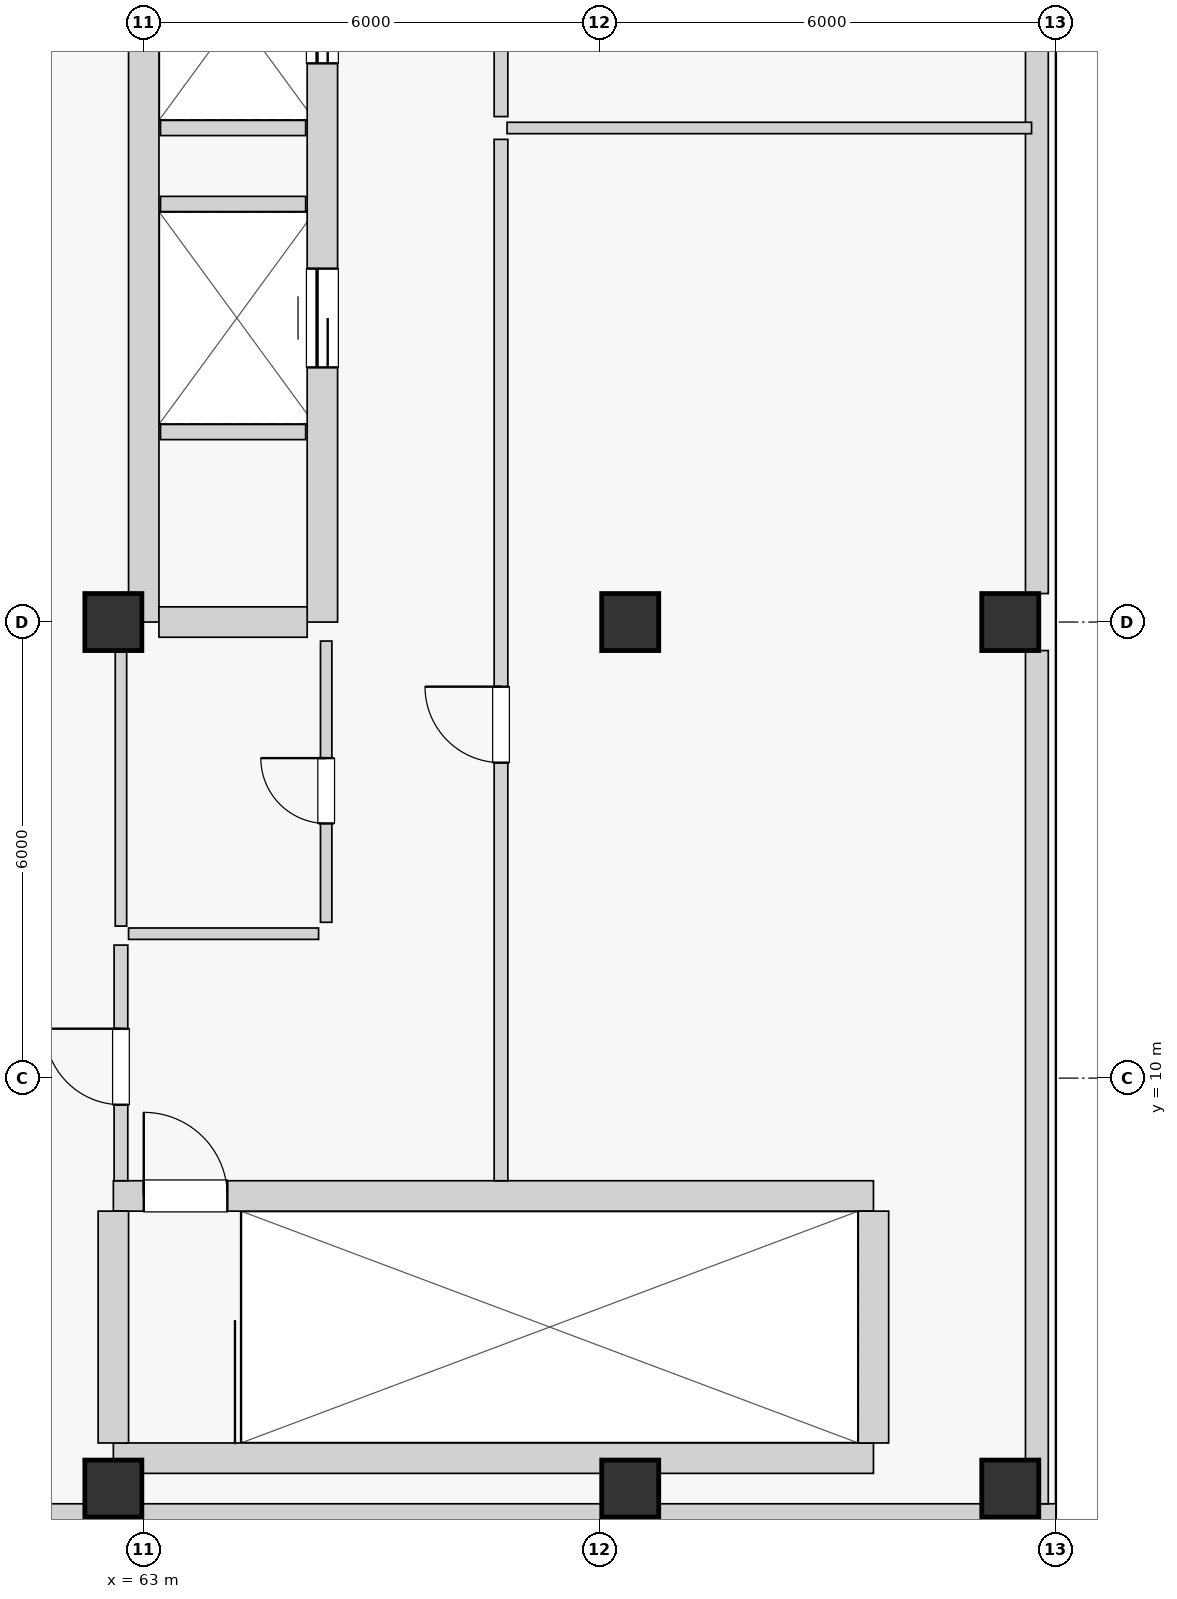
"""IFC4 building model, lengths in metres.
Left out: names, types, materials, properties, quantities, classifications, styles, units other than length and angle.
Written with IfcOpenShell. Run it as: python <this file> out.ifc"""

import sys

from ifc_helpers import new_model, si_unit, direction, frame, frame_2d, origin, origin_2d, place, context, subcontext, project, spatial, rectangle, extrude, source, transform, mapped, element, fill, save


model = new_model("IFC4")
c1 = context("Model", 3, precision=1e-05, world=origin(), true_north=direction((0.0, 1.0)))
c2 = subcontext(c1, "Body", "Model", "MODEL_VIEW")
j1 = project(units=[si_unit("LENGTHUNIT", "METRE"), si_unit("PLANEANGLEUNIT", "RADIAN")], contexts=[c1])
p1 = place(None, origin())
s1 = spatial("IfcSite", under=j1, at=p1, CompositionType="ELEMENT")
p2 = place(p1, origin())
s2 = spatial("IfcBuilding", under=s1, at=p2, CompositionType="ELEMENT")
p3 = place(p2, frame((0.0, 0.0, 18.4)))
s3 = spatial("IfcBuildingStorey", under=s2, at=p3, CompositionType="ELEMENT", Elevation=18.4)
for number, where, z_axis, x_axis in (
    (1, (62.6, 4.6, 0.0), (0.0, 0.0, 1.0), (1.0, 0.0, 0.0)),
    (2, (62.6, 16.0, 0.0), (0.0, 0.0, 1.0), (1.0, 0.0, 0.0)),
    (3, (69.4, 4.6, 0.0), (0.0, 0.0, 1.0), (1.0, 0.0, 0.0)),
    (4, (69.4, 16.0, 0.0), (0.0, 0.0, 1.0), (1.0, 0.0, 0.0)),
    (5, (74.4, 4.6, 0.0), (0.0, 0.0, 1.0), (1.0, 0.0, 0.0)),
    (6, (74.4, 16.0, 0.0), (0.0, 0.0, 1.0), (1.0, 0.0, 0.0)),
):
    element("IfcColumn", number, at=place(p3, frame(where, z_axis=z_axis, x_axis=x_axis)), inside=s3, PredefinedType="COLUMN", context=c2, shape_type="SweptSolid", body=[
        extrude(rectangle(XDim=0.75, YDim=0.75, at=origin_2d()), origin(), (0.0, 0.0, 1.0), 4.4),
    ])
p4 = place(p3, frame((57.0, 4.25, 0.0), z_axis=(0.0, 0.0, 1.0), x_axis=(1.0, 0.0, 0.0)))
e7 = element("IfcWall", 7, at=p4, inside=s3, PredefinedType="SOLIDWALL", context=c2, shape_type="SweptSolid", body=[
    extrude(rectangle(XDim=5.225, YDim=0.3, at=frame_2d((2.613, 0.0))), origin(), (0.0, 0.0, 1.0), 3.39),
])
p5 = place(p4, frame((2.2, 0.0, 0.85)))
e8 = element("IfcOpeningElement", 8, at=p5, cuts=e7, PredefinedType="OPENING", context=c2, shape_type="SweptSolid", body=[
    extrude(rectangle(XDim=1.8, YDim=1.65, at=frame_2d((0.9, 0.825))), frame((0.0, 0.16, 0.0), z_axis=(0.0, -1.0, 0.0), x_axis=(1.0, 0.0, 0.0)), (0.0, 0.0, 1.0), 0.32),
])
p6 = place(p3, frame((62.975, 4.25, 0.0), z_axis=(0.0, 0.0, 1.0), x_axis=(1.0, 0.0, 0.0)))
e9 = element("IfcWall", 9, at=p6, inside=s3, PredefinedType="SOLIDWALL", context=c2, shape_type="SweptSolid", body=[
    extrude(rectangle(XDim=6.05, YDim=0.3, at=frame_2d((3.025, 0.0))), origin(), (0.0, 0.0, 1.0), 3.39),
])
p7 = place(p6, frame((2.125, 0.0, 0.85)))
e10 = element("IfcOpeningElement", 10, at=p7, cuts=e9, PredefinedType="OPENING", context=c2, shape_type="SweptSolid", body=[
    extrude(rectangle(XDim=1.8, YDim=1.65, at=frame_2d((0.9, 0.825))), frame((0.0, 0.16, 0.0), z_axis=(0.0, -1.0, 0.0), x_axis=(1.0, 0.0, 0.0)), (0.0, 0.0, 1.0), 0.32),
])
p8 = place(p3, frame((69.775, 4.25, 0.0), z_axis=(0.0, 0.0, 1.0), x_axis=(1.0, 0.0, 0.0)))
e11 = element("IfcWall", 11, at=p8, inside=s3, PredefinedType="SOLIDWALL", context=c2, shape_type="SweptSolid", body=[
    extrude(rectangle(XDim=5.225, YDim=0.3, at=frame_2d((2.613, 0.0))), origin(), (0.0, 0.0, 1.0), 3.39),
])
p9 = place(p8, frame((1.225, 0.0, 0.85)))
e12 = element("IfcOpeningElement", 12, at=p9, cuts=e11, PredefinedType="OPENING", context=c2, shape_type="SweptSolid", body=[
    extrude(rectangle(XDim=1.8, YDim=1.65, at=frame_2d((0.9, 0.825))), frame((0.0, 0.16, 0.0), z_axis=(0.0, -1.0, 0.0), x_axis=(1.0, 0.0, 0.0)), (0.0, 0.0, 1.0), 0.32),
])
p10 = place(p3, frame((74.75, 4.4, 0.0), z_axis=(0.0, 0.0, 1.0), x_axis=(0.0, 1.0, 0.0)))
e13 = element("IfcWall", 13, at=p10, inside=s3, PredefinedType="SOLIDWALL", context=c2, shape_type="SweptSolid", body=[
    extrude(rectangle(XDim=11.225, YDim=0.3, at=frame_2d((5.613, 0.0))), origin(), (0.0, 0.0, 1.0), 3.39),
])
p11 = place(p10, frame((5.3, 0.0, 0.95)))
e14 = element("IfcOpeningElement", 14, at=p11, cuts=e13, PredefinedType="OPENING", context=c2, shape_type="SweptSolid", body=[
    extrude(rectangle(XDim=1.2, YDim=1.5, at=frame_2d((0.6, 0.75))), frame((0.0, 0.16, 0.0), z_axis=(0.0, -1.0, 0.0), x_axis=(1.0, 0.0, 0.0)), (0.0, 0.0, 1.0), 0.32),
])
p12 = place(p3, frame((74.75, 16.375, 0.0), z_axis=(0.0, 0.0, 1.0), x_axis=(0.0, 1.0, 0.0)))
e15 = element("IfcWall", 15, at=p12, inside=s3, PredefinedType="SOLIDWALL", context=c2, shape_type="SweptSolid", body=[
    extrude(rectangle(XDim=11.25, YDim=0.3, at=frame_2d((5.625, 0.0))), origin(), (0.0, 0.0, 1.0), 3.39),
])
p13 = place(p12, frame((5.025, 0.0, 0.95)))
e16 = element("IfcOpeningElement", 16, at=p13, cuts=e15, PredefinedType="OPENING", context=c2, shape_type="SweptSolid", body=[
    extrude(rectangle(XDim=1.2, YDim=1.5, at=frame_2d((0.6, 0.75))), frame((0.0, 0.16, 0.0), z_axis=(0.0, -1.0, 0.0), x_axis=(1.0, 0.0, 0.0)), (0.0, 0.0, 1.0), 0.32),
])
p14 = place(p3, frame((63.0, 16.0, 0.0), z_axis=(0.0, 0.0, 1.0), x_axis=(0.0, 1.0, 0.0)))
e17 = element("IfcWall", 17, at=p14, inside=s3, PredefinedType="SHEAR", context=c2, shape_type="SweptSolid", body=[
    extrude(rectangle(XDim=12.0, YDim=0.4, at=frame_2d((6.0, 0.0))), origin(), (0.0, 0.0, 1.0), 4.14),
])
p15 = place(p3, frame((65.35, 16.0, 0.0), z_axis=(0.0, 0.0, 1.0), x_axis=(0.0, 1.0, 0.0)))
e18 = element("IfcWall", 18, at=p15, inside=s3, PredefinedType="SHEAR", context=c2, shape_type="SweptSolid", body=[
    extrude(rectangle(XDim=12.0, YDim=0.4, at=frame_2d((6.0, 0.0))), origin(), (0.0, 0.0, 1.0), 4.14),
])
p16 = place(p15, frame((3.35, 0.0, 0.0)))
e19 = element("IfcOpeningElement", 19, at=p16, cuts=e18, PredefinedType="OPENING", context=c2, shape_type="SweptSolid", body=[
    extrude(rectangle(XDim=1.3, YDim=2.25, at=frame_2d((0.65, 1.125))), frame((0.0, 0.21, 0.0), z_axis=(0.0, -1.0, 0.0), x_axis=(1.0, 0.0, 0.0)), (0.0, 0.0, 1.0), 0.42),
])
p17 = place(p15, frame((7.35, 0.0, 0.0)))
e20 = element("IfcOpeningElement", 20, at=p17, cuts=e18, PredefinedType="OPENING", context=c2, shape_type="SweptSolid", body=[
    extrude(rectangle(XDim=1.3, YDim=2.25, at=frame_2d((0.65, 1.125))), frame((0.0, 0.21, 0.0), z_axis=(0.0, -1.0, 0.0), x_axis=(1.0, 0.0, 0.0)), (0.0, 0.0, 1.0), 0.42),
])
p18 = place(p3, frame((63.2, 16.0, 0.0), z_axis=(0.0, 0.0, 1.0), x_axis=(1.0, 0.0, 0.0)))
e21 = element("IfcWall", 21, at=p18, inside=s3, PredefinedType="SHEAR", context=c2, shape_type="SweptSolid", body=[
    extrude(rectangle(XDim=1.95, YDim=0.4, at=frame_2d((0.975, 0.0))), origin(), (0.0, 0.0, 1.0), 4.14),
])
for number, where, z_axis, x_axis in (
    (22, (63.22, 18.5, 0.0), (0.0, 0.0, 1.0), (1.0, 0.0, 0.0)),
    (23, (63.22, 21.5, 0.0), (0.0, 0.0, 1.0), (1.0, 0.0, 0.0)),
    (24, (63.22, 22.5, 0.0), (0.0, 0.0, 1.0), (1.0, 0.0, 0.0)),
):
    element("IfcWall", number, at=place(p3, frame(where, z_axis=z_axis, x_axis=x_axis)), inside=s3, PredefinedType="SOLIDWALL", context=c2, shape_type="SweptSolid", body=[
        extrude(rectangle(XDim=1.91, YDim=0.2, at=frame_2d((0.955, 0.0))), origin(), (0.0, 0.0, 1.0), 4.14),
    ])
p19 = place(p3, frame((62.6, 5.0, 0.0), z_axis=(0.0, 0.0, 1.0), x_axis=(1.0, 0.0, 0.0)))
e25 = element("IfcWall", 25, at=p19, inside=s3, PredefinedType="SHEAR", context=c2, shape_type="SweptSolid", body=[
    extrude(rectangle(XDim=10.0, YDim=0.4, at=frame_2d((5.0, 0.0))), origin(), (0.0, 0.0, 1.0), 4.14),
])
p20 = place(p3, frame((62.6, 8.45, 0.0), z_axis=(0.0, 0.0, 1.0), x_axis=(1.0, 0.0, 0.0)))
e26 = element("IfcWall", 26, at=p20, inside=s3, PredefinedType="SHEAR", context=c2, shape_type="SweptSolid", body=[
    extrude(rectangle(XDim=10.0, YDim=0.4, at=frame_2d((5.0, 0.0))), origin(), (0.0, 0.0, 1.0), 4.14),
])
p21 = place(p20, frame((0.4, 0.0, 0.0)))
e27 = element("IfcOpeningElement", 27, at=p21, cuts=e26, PredefinedType="OPENING", context=c2, shape_type="SweptSolid", body=[
    extrude(rectangle(XDim=1.1, YDim=2.03, at=frame_2d((0.55, 1.015))), frame((0.0, 0.21, 0.0), z_axis=(0.0, -1.0, 0.0), x_axis=(1.0, 0.0, 0.0)), (0.0, 0.0, 1.0), 0.42),
])
for number, where, z_axis, x_axis in (
    (28, (62.6, 5.2, 0.0), (0.0, 0.0, 1.0), (0.0, 1.0, 0.0)),
    (29, (72.6, 5.2, 0.0), (0.0, 0.0, 1.0), (0.0, 1.0, 0.0)),
):
    element("IfcWall", number, at=place(p3, frame(where, z_axis=z_axis, x_axis=x_axis)), inside=s3, PredefinedType="SHEAR", context=c2, shape_type="SweptSolid", body=[
        extrude(rectangle(XDim=3.05, YDim=0.4, at=frame_2d((1.525, 0.0))), origin(), (0.0, 0.0, 1.0), 4.14),
    ])
p22 = place(p3, frame((62.8, 11.9, 0.0), z_axis=(0.0, 0.0, 1.0), x_axis=(1.0, 0.0, 0.0)))
e30 = element("IfcWall", 30, at=p22, inside=s3, PredefinedType="PARTITIONING", context=c2, shape_type="SweptSolid", body=[
    extrude(rectangle(XDim=2.5, YDim=0.15, at=frame_2d((1.25, 0.0))), origin(), (0.0, 0.0, 1.0), 4.14),
])
p23 = place(p3, frame((62.7, 12.0, 0.0), z_axis=(0.0, 0.0, 1.0), x_axis=(0.0, 1.0, 0.0)))
e31 = element("IfcWall", 31, at=p23, inside=s3, PredefinedType="PARTITIONING", context=c2, shape_type="SweptSolid", body=[
    extrude(rectangle(XDim=3.8, YDim=0.15, at=frame_2d((1.9, 0.0))), origin(), (0.0, 0.0, 1.0), 3.54),
])
p24 = place(p3, frame((65.4, 12.05, 0.0), z_axis=(0.0, 0.0, 1.0), x_axis=(0.0, 1.0, 0.0)))
e32 = element("IfcWall", 32, at=p24, inside=s3, PredefinedType="PARTITIONING", context=c2, shape_type="SweptSolid", body=[
    extrude(rectangle(XDim=3.7, YDim=0.15, at=frame_2d((1.85, 0.0))), origin(), (0.0, 0.0, 1.0), 4.14),
])
p25 = place(p24, frame((1.3, 0.0, 0.0)))
e33 = element("IfcOpeningElement", 33, at=p25, cuts=e32, PredefinedType="OPENING", context=c2, shape_type="SweptSolid", body=[
    extrude(rectangle(XDim=0.86, YDim=2.01, at=frame_2d((0.43, 1.005))), frame((0.0, 0.085, 0.0), z_axis=(0.0, -1.0, 0.0), x_axis=(1.0, 0.0, 0.0)), (0.0, 0.0, 1.0), 0.17),
])
p26 = place(p3, frame((62.7, 8.65, 0.0), z_axis=(0.0, 0.0, 1.0), x_axis=(0.0, 1.0, 0.0)))
e34 = element("IfcWall", 34, at=p26, inside=s3, PredefinedType="PARTITIONING", context=c2, shape_type="SweptSolid", body=[
    extrude(rectangle(XDim=3.1, YDim=0.18, at=frame_2d((1.55, 0.0))), origin(), (0.0, 0.0, 1.0), 3.54),
])
p27 = place(p26, frame((1.0, 0.0, 0.0)))
e35 = element("IfcOpeningElement", 35, at=p27, cuts=e34, PredefinedType="OPENING", context=c2, shape_type="SweptSolid", body=[
    extrude(rectangle(XDim=1.0, YDim=2.01, at=frame_2d((0.5, 1.005))), frame((0.0, 0.1, 0.0), z_axis=(0.0, -1.0, 0.0), x_axis=(1.0, 0.0, 0.0)), (0.0, 0.0, 1.0), 0.2),
])
p28 = place(p3, frame((67.7, 8.65, 0.0), z_axis=(0.0, 0.0, 1.0), x_axis=(0.0, 1.0, 0.0)))
e36 = element("IfcWall", 36, at=p28, inside=s3, PredefinedType="PARTITIONING", context=c2, shape_type="SweptSolid", body=[
    extrude(rectangle(XDim=13.7, YDim=0.18, at=frame_2d((6.85, 0.0))), origin(), (0.0, 0.0, 1.0), 4.14),
])
p29 = place(p28, frame((5.5, 0.0, 0.0)))
e37 = element("IfcOpeningElement", 37, at=p29, cuts=e36, PredefinedType="OPENING", context=c2, shape_type="SweptSolid", body=[
    extrude(rectangle(XDim=1.0, YDim=2.01, at=frame_2d((0.5, 1.005))), frame((0.0, 0.1, 0.0), z_axis=(0.0, -1.0, 0.0), x_axis=(1.0, 0.0, 0.0)), (0.0, 0.0, 1.0), 0.2),
])
p30 = place(p3, frame((67.7, 22.65, 0.0), z_axis=(0.0, 0.0, 1.0), x_axis=(0.0, 1.0, 0.0)))
e38 = element("IfcWall", 38, at=p30, inside=s3, PredefinedType="PARTITIONING", context=c2, shape_type="SweptSolid", body=[
    extrude(rectangle(XDim=16.7, YDim=0.18, at=frame_2d((8.35, 0.0))), origin(), (0.0, 0.0, 1.0), 4.14),
])
p31 = place(p30, frame((5.5, 0.0, 0.0)))
e39 = element("IfcOpeningElement", 39, at=p31, cuts=e38, PredefinedType="OPENING", context=c2, shape_type="SweptSolid", body=[
    extrude(rectangle(XDim=1.0, YDim=2.01, at=frame_2d((0.5, 1.005))), frame((0.0, 0.1, 0.0), z_axis=(0.0, -1.0, 0.0), x_axis=(1.0, 0.0, 0.0)), (0.0, 0.0, 1.0), 0.2),
])
p32 = place(p3, frame((67.78, 22.5, 0.0), z_axis=(0.0, 0.0, 1.0), x_axis=(1.0, 0.0, 0.0)))
e40 = element("IfcWall", 40, at=p32, inside=s3, PredefinedType="PARTITIONING", context=c2, shape_type="SweptSolid", body=[
    extrude(rectangle(XDim=6.9, YDim=0.15, at=frame_2d((3.45, 0.0))), origin(), (0.0, 0.0, 1.0), 4.14),
])
m1 = source(origin(), c2, "Body", "SweptSolid", [
    extrude(rectangle(XDim=1.8, YDim=1.65, at=frame_2d((0.9, 0.825))), frame((0.0, 0.03, 0.0), z_axis=(0.0, -1.0, 0.0), x_axis=(1.0, 0.0, 0.0)), (0.0, 0.0, 1.0), 0.06),
])
p33 = place(p7, origin())
e41 = element("IfcWindow", 41, at=p33, inside=s3, PartitioningType="DOUBLE_PANEL_VERTICAL", PredefinedType="WINDOW", context=c2, shape_type="MappedRepresentation", body=[
    mapped(m1, transform((0.0, 0.0, 0.0), scale=1.0)),
])
fill(e10, e41)
p34 = place(p9, origin())
e42 = element("IfcWindow", 42, at=p34, inside=s3, PartitioningType="DOUBLE_PANEL_VERTICAL", PredefinedType="WINDOW", context=c2, shape_type="MappedRepresentation", body=[
    mapped(m1, transform((0.0, 0.0, 0.0), scale=1.0)),
])
fill(e12, e42)
m2 = source(origin(), c2, "Body", "SweptSolid", [
    extrude(rectangle(XDim=1.2, YDim=1.5, at=frame_2d((0.6, 0.75))), frame((0.0, 0.03, 0.0), z_axis=(0.0, -1.0, 0.0), x_axis=(1.0, 0.0, 0.0)), (0.0, 0.0, 1.0), 0.06),
])
p35 = place(p11, origin())
e43 = element("IfcWindow", 43, at=p35, inside=s3, PartitioningType="SINGLE_PANEL", PredefinedType="WINDOW", context=c2, shape_type="MappedRepresentation", body=[
    mapped(m2, transform((0.0, 0.0, 0.0), scale=1.0)),
])
fill(e14, e43)
p36 = place(p13, origin())
e44 = element("IfcWindow", 44, at=p36, inside=s3, PartitioningType="SINGLE_PANEL", PredefinedType="WINDOW", context=c2, shape_type="MappedRepresentation", body=[
    mapped(m2, transform((0.0, 0.0, 0.0), scale=1.0)),
])
fill(e16, e44)
m3 = source(origin(), c2, "Body", "SweptSolid", [
    extrude(rectangle(XDim=1.3, YDim=2.25, at=frame_2d((0.65, 1.125))), frame((0.0, 0.025, 0.0), z_axis=(0.0, -1.0, 0.0), x_axis=(1.0, 0.0, 0.0)), (0.0, 0.0, 1.0), 0.05),
])
p37 = place(p16, origin())
e45 = element("IfcDoor", 45, at=p37, inside=s3, OperationType="SLIDING_TO_LEFT", PredefinedType="DOOR", context=c2, shape_type="MappedRepresentation", body=[
    mapped(m3, transform((0.0, 0.0, 0.0), scale=1.0)),
])
fill(e19, e45)
p38 = place(p17, origin())
e46 = element("IfcDoor", 46, at=p38, inside=s3, OperationType="SLIDING_TO_LEFT", PredefinedType="DOOR", context=c2, shape_type="MappedRepresentation", body=[
    mapped(m3, transform((0.0, 0.0, 0.0), scale=1.0)),
])
fill(e20, e46)
m4 = source(origin(), c2, "Body", "SweptSolid", [
    extrude(rectangle(XDim=1.1, YDim=2.03, at=frame_2d((0.55, 1.015))), frame((0.0, 0.025, 0.0), z_axis=(0.0, -1.0, 0.0), x_axis=(1.0, 0.0, 0.0)), (0.0, 0.0, 1.0), 0.05),
])
p39 = place(p21, origin())
e47 = element("IfcDoor", 47, at=p39, inside=s3, OperationType="SINGLE_SWING_LEFT", PredefinedType="DOOR", context=c2, shape_type="MappedRepresentation", body=[
    mapped(m4, transform((0.0, 0.0, 0.0), scale=1.0)),
])
fill(e27, e47)
m5 = source(origin(), c2, "Body", "SweptSolid", [
    extrude(rectangle(XDim=0.86, YDim=2.01, at=frame_2d((0.43, 1.005))), frame((0.0, 0.025, 0.0), z_axis=(0.0, -1.0, 0.0), x_axis=(1.0, 0.0, 0.0)), (0.0, 0.0, 1.0), 0.05),
])
p40 = place(p25, origin())
e48 = element("IfcDoor", 48, at=p40, inside=s3, OperationType="SINGLE_SWING_RIGHT", PredefinedType="DOOR", context=c2, shape_type="MappedRepresentation", body=[
    mapped(m5, transform((0.0, 0.0, 0.0), scale=1.0)),
])
fill(e33, e48)
m6 = source(origin(), c2, "Body", "SweptSolid", [
    extrude(rectangle(XDim=1.0, YDim=2.01, at=frame_2d((0.5, 1.005))), frame((0.0, 0.025, 0.0), z_axis=(0.0, -1.0, 0.0), x_axis=(1.0, 0.0, 0.0)), (0.0, 0.0, 1.0), 0.05),
])
p41 = place(p27, origin())
e49 = element("IfcDoor", 49, at=p41, inside=s3, OperationType="SINGLE_SWING_RIGHT", PredefinedType="DOOR", context=c2, shape_type="MappedRepresentation", body=[
    mapped(m6, transform((0.0, 0.0, 0.0), scale=1.0)),
])
fill(e35, e49)
p42 = place(p29, origin())
e50 = element("IfcDoor", 50, at=p42, inside=s3, OperationType="SINGLE_SWING_RIGHT", PredefinedType="DOOR", context=c2, shape_type="MappedRepresentation", body=[
    mapped(m6, transform((0.0, 0.0, 0.0), scale=1.0)),
])
fill(e37, e50)
save(model, sys.argv[1])
